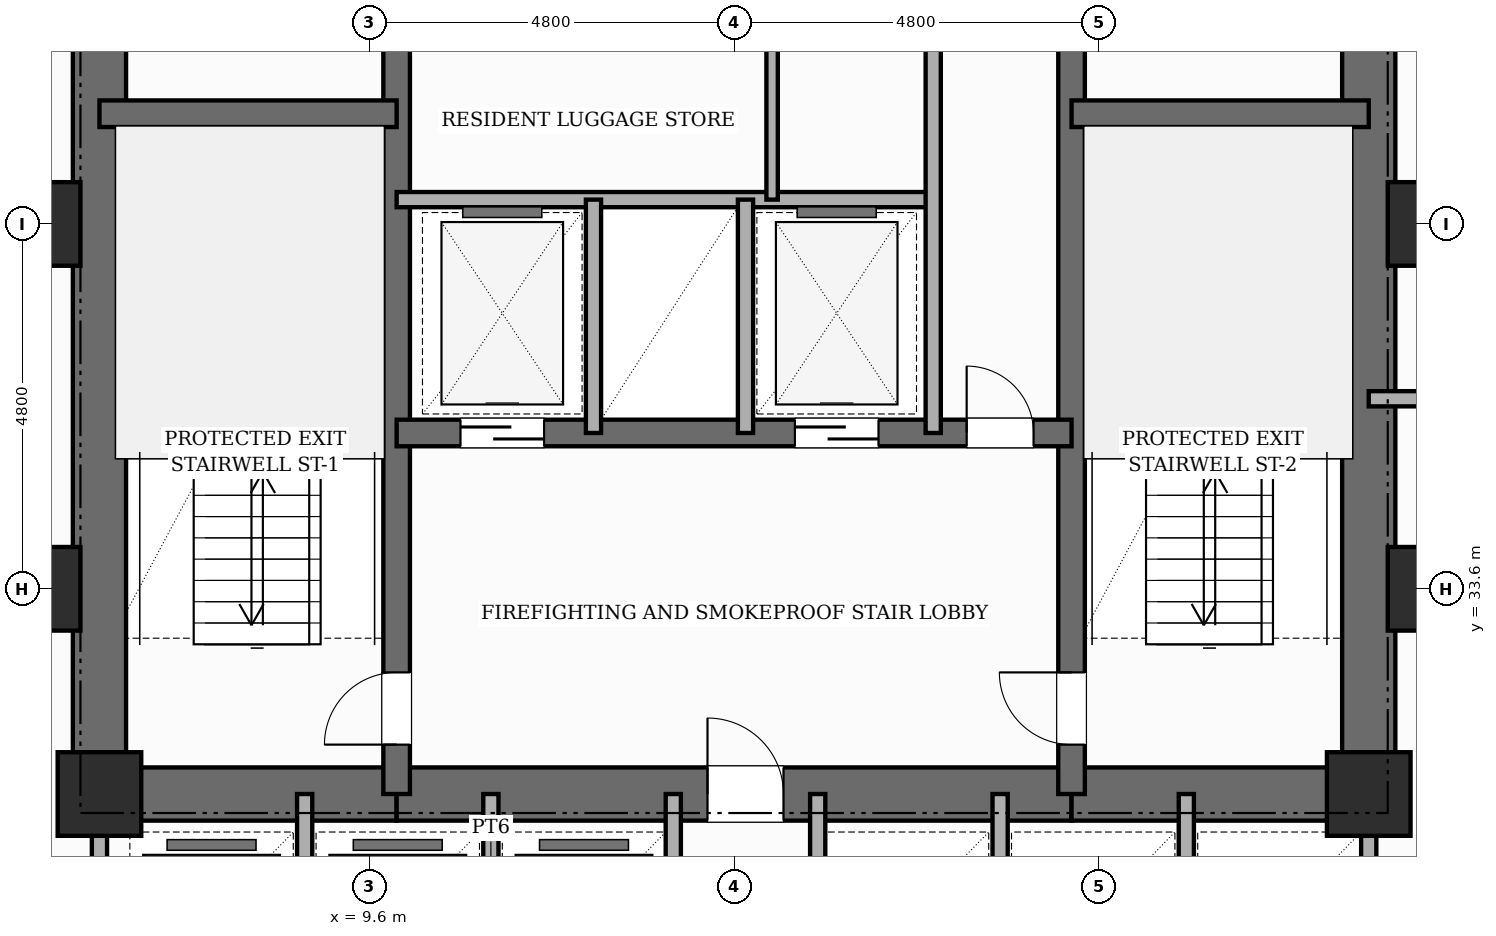
"""IFC4 building model, lengths in metres.
Left out: names, types, materials, properties, quantities, classifications, styles, units other than length and angle.
Written with IfcOpenShell. Run it as: python <this file> out.ifc"""

import sys

from ifc_helpers import new_model, si_unit, direction, frame, frame_2d, origin, origin_2d, place, context, subcontext, project, spatial, rectangle, extrude, element, fill, save


model = new_model("IFC4")
c1 = context("Model", 3, precision=1e-05, world=origin(), true_north=direction((0.0, 1.0)))
c2 = subcontext(c1, "Body", "Model", "MODEL_VIEW")
j1 = project(units=[si_unit("LENGTHUNIT", "METRE"), si_unit("PLANEANGLEUNIT", "RADIAN")], contexts=[c1])
p1 = place(None, origin())
s1 = spatial("IfcSite", under=j1, at=p1, CompositionType="ELEMENT")
p2 = place(p1, origin())
s2 = spatial("IfcBuilding", under=s1, at=p2, CompositionType="ELEMENT")
p3 = place(p2, frame((0.0, 0.0, 28.6)))
s3 = spatial("IfcBuildingStorey", under=s2, at=p3, CompositionType="ELEMENT", Elevation=28.6)
p4 = place(p3, frame((6.05, 30.55, 0.0), z_axis=(0.0, 0.0, 1.0), x_axis=(0.0, 1.0, 0.0)))
e1 = element("IfcWall", 1, at=p4, inside=s3, PredefinedType="SHEAR", context=c2, shape_type="SweptSolid", body=[
    extrude(rectangle(XDim=15.6, YDim=0.7, at=frame_2d((7.8, 0.0))), origin(), (0.0, 0.0, 1.0), 3.6),
])
p5 = place(p3, frame((22.75, 30.55, 0.0), z_axis=(0.0, 0.0, 1.0), x_axis=(0.0, 1.0, 0.0)))
e2 = element("IfcWall", 2, at=p5, inside=s3, PredefinedType="SHEAR", context=c2, shape_type="SweptSolid", body=[
    extrude(rectangle(XDim=15.6, YDim=0.7, at=frame_2d((7.8, 0.0))), origin(), (0.0, 0.0, 1.0), 3.6),
])
p6 = place(p5, frame((10.8, 0.0, 0.0)))
e3 = element("IfcOpeningElement", 3, at=p6, cuts=e2, PredefinedType="OPENING", context=c2, shape_type="SweptSolid", body=[
    extrude(rectangle(XDim=1.0, YDim=2.15, at=frame_2d((0.5, 1.075))), frame((0.0, 0.36, 0.0), z_axis=(0.0, -1.0, 0.0), x_axis=(1.0, 0.0, 0.0)), (0.0, 0.0, 1.0), 0.72),
])
p7 = place(p3, frame((6.05, 30.9, 0.0), z_axis=(0.0, 0.0, 1.0), x_axis=(1.0, 0.0, 0.0)))
e4 = element("IfcWall", 4, at=p7, inside=s3, PredefinedType="SHEAR", context=c2, shape_type="SweptSolid", body=[
    extrude(rectangle(XDim=3.91, YDim=0.7, at=frame_2d((1.955, 0.0))), origin(), (0.0, 0.0, 1.0), 3.6),
])
p8 = place(p3, frame((9.96, 30.9, 0.0), z_axis=(0.0, 0.0, 1.0), x_axis=(1.0, 0.0, 0.0)))
e5 = element("IfcWall", 5, at=p8, inside=s3, PredefinedType="SHEAR", context=c2, shape_type="SweptSolid", body=[
    extrude(rectangle(XDim=8.88, YDim=0.7, at=frame_2d((4.44, 0.0))), origin(), (0.0, 0.0, 1.0), 3.6),
])
p9 = place(p8, frame((4.09, 0.0, 0.0)))
e6 = element("IfcOpeningElement", 6, at=p9, cuts=e5, PredefinedType="OPENING", context=c2, shape_type="SweptSolid", body=[
    extrude(rectangle(XDim=1.0, YDim=2.15, at=frame_2d((0.5, 1.075))), frame((0.0, 0.36, 0.0), z_axis=(0.0, -1.0, 0.0), x_axis=(1.0, 0.0, 0.0)), (0.0, 0.0, 1.0), 0.72),
])
p10 = place(p3, frame((18.84, 30.9, 0.0), z_axis=(0.0, 0.0, 1.0), x_axis=(1.0, 0.0, 0.0)))
e7 = element("IfcWall", 7, at=p10, inside=s3, PredefinedType="SHEAR", context=c2, shape_type="SweptSolid", body=[
    extrude(rectangle(XDim=3.91, YDim=0.7, at=frame_2d((1.955, 0.0))), origin(), (0.0, 0.0, 1.0), 3.6),
])
p11 = place(p3, frame((9.96, 30.9, 0.0), z_axis=(0.0, 0.0, 1.0), x_axis=(0.0, 1.0, 0.0)))
e8 = element("IfcWall", 8, at=p11, inside=s3, PredefinedType="SHEAR", context=c2, shape_type="SweptSolid", body=[
    extrude(rectangle(XDim=14.9, YDim=0.35, at=frame_2d((7.45, 0.0))), origin(), (0.0, 0.0, 1.0), 3.6),
])
p12 = place(p11, frame((0.65, 0.0, 0.0)))
e9 = element("IfcOpeningElement", 9, at=p12, cuts=e8, PredefinedType="OPENING", context=c2, shape_type="SweptSolid", body=[
    extrude(rectangle(XDim=0.95, YDim=2.1, at=frame_2d((0.475, 1.05))), frame((0.0, 0.185, 0.0), z_axis=(0.0, -1.0, 0.0), x_axis=(1.0, 0.0, 0.0)), (0.0, 0.0, 1.0), 0.37),
])
p13 = place(p11, frame((10.45, 0.0, 0.0)))
e10 = element("IfcOpeningElement", 10, at=p13, cuts=e8, PredefinedType="OPENING", context=c2, shape_type="SweptSolid", body=[
    extrude(rectangle(XDim=1.0, YDim=2.15, at=frame_2d((0.5, 1.075))), frame((0.0, 0.185, 0.0), z_axis=(0.0, -1.0, 0.0), x_axis=(1.0, 0.0, 0.0)), (0.0, 0.0, 1.0), 0.37),
])
p14 = place(p3, frame((18.84, 30.9, 0.0), z_axis=(0.0, 0.0, 1.0), x_axis=(0.0, 1.0, 0.0)))
e11 = element("IfcWall", 11, at=p14, inside=s3, PredefinedType="SHEAR", context=c2, shape_type="SweptSolid", body=[
    extrude(rectangle(XDim=14.9, YDim=0.35, at=frame_2d((7.45, 0.0))), origin(), (0.0, 0.0, 1.0), 3.6),
])
p15 = place(p14, frame((0.65, 0.0, 0.0)))
e12 = element("IfcOpeningElement", 12, at=p15, cuts=e11, PredefinedType="OPENING", context=c2, shape_type="SweptSolid", body=[
    extrude(rectangle(XDim=0.95, YDim=2.1, at=frame_2d((0.475, 1.05))), frame((0.0, 0.185, 0.0), z_axis=(0.0, -1.0, 0.0), x_axis=(1.0, 0.0, 0.0)), (0.0, 0.0, 1.0), 0.37),
])
p16 = place(p14, frame((10.45, 0.0, 0.0)))
e13 = element("IfcOpeningElement", 13, at=p16, cuts=e11, PredefinedType="OPENING", context=c2, shape_type="SweptSolid", body=[
    extrude(rectangle(XDim=1.0, YDim=2.15, at=frame_2d((0.5, 1.075))), frame((0.0, 0.185, 0.0), z_axis=(0.0, -1.0, 0.0), x_axis=(1.0, 0.0, 0.0)), (0.0, 0.0, 1.0), 0.37),
])
for number, where, z_axis, x_axis in (
    (14, (6.05, 39.85, 0.0), (0.0, 0.0, 1.0), (1.0, 0.0, 0.0)),
    (15, (18.84, 39.85, 0.0), (0.0, 0.0, 1.0), (1.0, 0.0, 0.0)),
):
    element("IfcWall", number, at=place(p3, frame(where, z_axis=z_axis, x_axis=x_axis)), inside=s3, PredefinedType="SHEAR", context=c2, shape_type="SweptSolid", body=[
        extrude(rectangle(XDim=3.91, YDim=0.35, at=frame_2d((1.955, 0.0))), origin(), (0.0, 0.0, 1.0), 3.6),
    ])
p17 = place(p3, frame((9.96, 35.65, 0.0), z_axis=(0.0, 0.0, 1.0), x_axis=(1.0, 0.0, 0.0)))
e16 = element("IfcWall", 16, at=p17, inside=s3, PredefinedType="SHEAR", context=c2, shape_type="SweptSolid", body=[
    extrude(rectangle(XDim=8.88, YDim=0.35, at=frame_2d((4.44, 0.0))), origin(), (0.0, 0.0, 1.0), 3.6),
])
p18 = place(p17, frame((0.84, 0.0, 0.0)))
e17 = element("IfcOpeningElement", 17, at=p18, cuts=e16, PredefinedType="OPENING", context=c2, shape_type="SweptSolid", body=[
    extrude(rectangle(XDim=1.1, YDim=2.15, at=frame_2d((0.55, 1.075))), frame((0.0, 0.185, 0.0), z_axis=(0.0, -1.0, 0.0), x_axis=(1.0, 0.0, 0.0)), (0.0, 0.0, 1.0), 0.37),
])
p19 = place(p17, frame((5.24, 0.0, 0.0)))
e18 = element("IfcOpeningElement", 18, at=p19, cuts=e16, PredefinedType="OPENING", context=c2, shape_type="SweptSolid", body=[
    extrude(rectangle(XDim=1.1, YDim=2.15, at=frame_2d((0.55, 1.075))), frame((0.0, 0.185, 0.0), z_axis=(0.0, -1.0, 0.0), x_axis=(1.0, 0.0, 0.0)), (0.0, 0.0, 1.0), 0.37),
])
p20 = place(p17, frame((7.5, 0.0, 0.0)))
e19 = element("IfcOpeningElement", 19, at=p20, cuts=e16, PredefinedType="OPENING", context=c2, shape_type="SweptSolid", body=[
    extrude(rectangle(XDim=0.88, YDim=2.1, at=frame_2d((0.44, 1.05))), frame((0.0, 0.185, 0.0), z_axis=(0.0, -1.0, 0.0), x_axis=(1.0, 0.0, 0.0)), (0.0, 0.0, 1.0), 0.37),
])
for number, where, z_axis, x_axis in (
    (20, (5.25, 33.6, 0.0), (0.0, 0.0, 1.0), (1.0, 0.0, 0.0)),
    (21, (5.25, 38.4, 0.0), (0.0, 0.0, 1.0), (1.0, 0.0, 0.0)),
    (22, (6.05, 30.9, 0.0), (0.0, 0.0, 1.0), (1.0, 0.0, 0.0)),
    (23, (22.75, 30.9, 0.0), (0.0, 0.0, 1.0), (1.0, 0.0, 0.0)),
    (24, (23.55, 33.6, 0.0), (0.0, 0.0, 1.0), (1.0, 0.0, 0.0)),
    (25, (23.55, 38.4, 0.0), (0.0, 0.0, 1.0), (1.0, 0.0, 0.0)),
):
    element("IfcColumn", number, at=place(p3, frame(where, z_axis=z_axis, x_axis=x_axis)), inside=s3, PredefinedType="COLUMN", context=c2, shape_type="SweptSolid", body=[
        extrude(rectangle(XDim=1.1, YDim=1.1, at=origin_2d()), origin(), (0.0, 0.0, 1.0), 3.6),
    ])
p21 = place(p3, frame((9.96, 38.72, 0.0), z_axis=(0.0, 0.0, 1.0), x_axis=(1.0, 0.0, 0.0)))
e26 = element("IfcWall", 26, at=p21, inside=s3, PredefinedType="POLYGONAL", context=c2, shape_type="SweptSolid", body=[
    extrude(rectangle(XDim=7.06, YDim=0.2, at=frame_2d((3.53, 0.0))), origin(), (0.0, 0.0, 1.0), 3.35),
])
for number, where, z_axis, x_axis in (
    (27, (12.55, 35.65, 0.0), (0.0, 0.0, 1.0), (0.0, 1.0, 0.0)),
    (28, (14.55, 35.65, 0.0), (0.0, 0.0, 1.0), (0.0, 1.0, 0.0)),
):
    element("IfcWall", number, at=place(p3, frame(where, z_axis=z_axis, x_axis=x_axis)), inside=s3, PredefinedType="POLYGONAL", context=c2, shape_type="SweptSolid", body=[
        extrude(rectangle(XDim=3.07, YDim=0.2, at=frame_2d((1.535, 0.0))), origin(), (0.0, 0.0, 1.0), 3.35),
    ])
p22 = place(p3, frame((17.02, 35.65, 0.0), z_axis=(0.0, 0.0, 1.0), x_axis=(0.0, 1.0, 0.0)))
e29 = element("IfcWall", 29, at=p22, inside=s3, PredefinedType="POLYGONAL", context=c2, shape_type="SweptSolid", body=[
    extrude(rectangle(XDim=5.15, YDim=0.2, at=frame_2d((2.575, 0.0))), origin(), (0.0, 0.0, 1.0), 3.35),
])
p23 = place(p3, frame((14.9, 38.72, 0.0), z_axis=(0.0, 0.0, 1.0), x_axis=(0.0, 1.0, 0.0)))
e30 = element("IfcWall", 30, at=p23, inside=s3, PredefinedType="PARTITIONING", context=c2, shape_type="SweptSolid", body=[
    extrude(rectangle(XDim=2.08, YDim=0.15, at=frame_2d((1.04, 0.0))), origin(), (0.0, 0.0, 1.0), 3.35),
])
for number, where, z_axis, x_axis in (
    (31, (6.05, 27.9, 0.0), (0.0, 0.0, 1.0), (0.0, 1.0, 0.0)),
    (32, (22.75, 27.9, 0.0), (0.0, 0.0, 1.0), (0.0, 1.0, 0.0)),
):
    element("IfcWall", number, at=place(p3, frame(where, z_axis=z_axis, x_axis=x_axis)), inside=s3, PredefinedType="POLYGONAL", context=c2, shape_type="SweptSolid", body=[
        extrude(rectangle(XDim=3.0, YDim=0.2, at=frame_2d((1.5, 0.0))), origin(), (0.0, 0.0, 1.0), 3.35),
    ])
for number, where, z_axis, x_axis in (
    (33, (13.6, 28.0, 0.0), (0.0, 0.0, 1.0), (0.0, 1.0, 0.0)),
    (34, (15.5, 28.0, 0.0), (0.0, 0.0, 1.0), (0.0, 1.0, 0.0)),
    (35, (8.75, 28.0, 0.0), (0.0, 0.0, 1.0), (0.0, 1.0, 0.0)),
    (36, (11.2, 28.0, 0.0), (0.0, 0.0, 1.0), (0.0, 1.0, 0.0)),
    (37, (17.9, 28.0, 0.0), (0.0, 0.0, 1.0), (0.0, 1.0, 0.0)),
    (38, (20.35, 28.0, 0.0), (0.0, 0.0, 1.0), (0.0, 1.0, 0.0)),
):
    element("IfcWall", number, at=place(p3, frame(where, z_axis=z_axis, x_axis=x_axis)), inside=s3, PredefinedType="POLYGONAL", context=c2, shape_type="SweptSolid", body=[
        extrude(rectangle(XDim=2.9, YDim=0.2, at=frame_2d((1.45, 0.0))), origin(), (0.0, 0.0, 1.0), 3.35),
    ])
p24 = place(p3, frame((22.75, 36.1, 0.0), z_axis=(0.0, 0.0, 1.0), x_axis=(1.0, 0.0, 0.0)))
e39 = element("IfcWall", 39, at=p24, inside=s3, PredefinedType="PARTITIONING", context=c2, shape_type="SweptSolid", body=[
    extrude(rectangle(XDim=21.27, YDim=0.2, at=frame_2d((10.635, 0.0))), origin(), (0.0, 0.0, 1.0), 3.35),
])
p25 = place(p24, frame((1.628, 0.0, 0.0)))
e40 = element("IfcOpeningElement", 40, at=p25, cuts=e39, PredefinedType="OPENING", context=c2, shape_type="SweptSolid", body=[
    extrude(rectangle(XDim=0.98, YDim=2.18, at=frame_2d((0.49, 1.09))), frame((0.0, 0.11, 0.0), z_axis=(0.0, -1.0, 0.0), x_axis=(1.0, 0.0, 0.0)), (0.0, 0.0, 1.0), 0.22),
])
p26 = place(p24, frame((14.725, 0.0, 0.0)))
e41 = element("IfcOpeningElement", 41, at=p26, cuts=e39, PredefinedType="OPENING", context=c2, shape_type="SweptSolid", body=[
    extrude(rectangle(XDim=0.98, YDim=2.18, at=frame_2d((0.49, 1.09))), frame((0.0, 0.11, 0.0), z_axis=(0.0, -1.0, 0.0), x_axis=(1.0, 0.0, 0.0)), (0.0, 0.0, 1.0), 0.22),
])
p27 = place(p12, origin())
e42 = element("IfcDoor", 42, at=p27, inside=s3, OperationType="SINGLE_SWING_LEFT", PredefinedType="DOOR", context=c2, shape_type="SweptSolid", body=[
    extrude(rectangle(XDim=0.95, YDim=2.1, at=frame_2d((0.475, 1.05))), frame((0.0, 0.025, 0.0), z_axis=(0.0, -1.0, 0.0), x_axis=(1.0, 0.0, 0.0)), (0.0, 0.0, 1.0), 0.05),
])
fill(e9, e42)
p28 = place(p15, origin())
e43 = element("IfcDoor", 43, at=p28, inside=s3, OperationType="SINGLE_SWING_RIGHT", PredefinedType="DOOR", context=c2, shape_type="SweptSolid", body=[
    extrude(rectangle(XDim=0.95, YDim=2.1, at=frame_2d((0.475, 1.05))), frame((0.0, 0.025, 0.0), z_axis=(0.0, -1.0, 0.0), x_axis=(1.0, 0.0, 0.0)), (0.0, 0.0, 1.0), 0.05),
])
fill(e12, e43)
p29 = place(p9, origin())
e44 = element("IfcDoor", 44, at=p29, inside=s3, OperationType="SINGLE_SWING_LEFT", PredefinedType="DOOR", context=c2, shape_type="SweptSolid", body=[
    extrude(rectangle(XDim=1.0, YDim=2.15, at=frame_2d((0.5, 1.075))), frame((0.0, 0.025, 0.0), z_axis=(0.0, -1.0, 0.0), x_axis=(1.0, 0.0, 0.0)), (0.0, 0.0, 1.0), 0.05),
])
fill(e6, e44)
p30 = place(p18, origin())
e45 = element("IfcDoor", 45, at=p30, inside=s3, OperationType="SLIDING_TO_LEFT", PredefinedType="DOOR", context=c2, shape_type="SweptSolid", body=[
    extrude(rectangle(XDim=1.1, YDim=2.15, at=frame_2d((0.55, 1.075))), frame((0.0, 0.025, 0.0), z_axis=(0.0, -1.0, 0.0), x_axis=(1.0, 0.0, 0.0)), (0.0, 0.0, 1.0), 0.05),
])
fill(e17, e45)
p31 = place(p19, origin())
e46 = element("IfcDoor", 46, at=p31, inside=s3, OperationType="SLIDING_TO_RIGHT", PredefinedType="DOOR", context=c2, shape_type="SweptSolid", body=[
    extrude(rectangle(XDim=1.1, YDim=2.15, at=frame_2d((0.55, 1.075))), frame((0.0, 0.025, 0.0), z_axis=(0.0, -1.0, 0.0), x_axis=(1.0, 0.0, 0.0)), (0.0, 0.0, 1.0), 0.05),
])
fill(e18, e46)
p32 = place(p20, origin())
e47 = element("IfcDoor", 47, at=p32, inside=s3, OperationType="SINGLE_SWING_LEFT", PredefinedType="DOOR", context=c2, shape_type="SweptSolid", body=[
    extrude(rectangle(XDim=0.88, YDim=2.1, at=frame_2d((0.44, 1.05))), frame((0.0, 0.025, 0.0), z_axis=(0.0, -1.0, 0.0), x_axis=(1.0, 0.0, 0.0)), (0.0, 0.0, 1.0), 0.05),
])
fill(e19, e47)
save(model, sys.argv[1])
